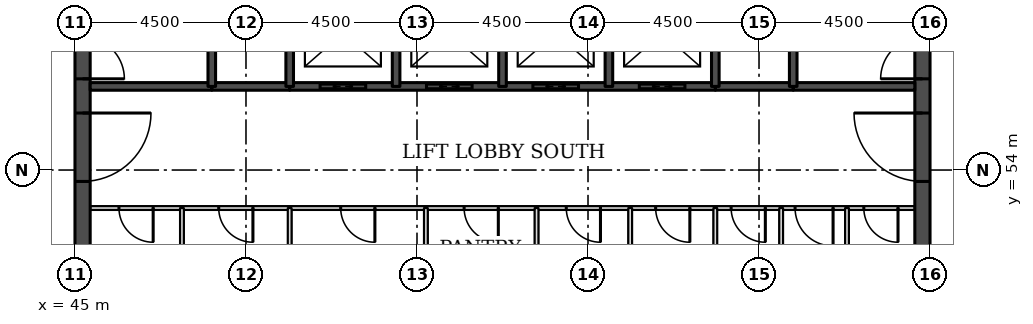
"""IFC4 building model, lengths in metres.
Left out: names, types, materials, properties, quantities, classifications, styles, units other than length and angle.
Written with IfcOpenShell. Run it as: python <this file> out.ifc"""

import sys

from ifc_helpers import new_model, si_unit, direction, frame, frame_2d, origin, place, context, subcontext, project, spatial, rectangle, extrude, element, fill, save


model = new_model("IFC4")
c1 = context("Model", 3, precision=1e-05, world=origin(), true_north=direction((0.0, 1.0)))
c2 = subcontext(c1, "Body", "Model", "MODEL_VIEW")
j1 = project(units=[si_unit("LENGTHUNIT", "METRE"), si_unit("PLANEANGLEUNIT", "RADIAN")], contexts=[c1])
p1 = place(None, origin())
s1 = spatial("IfcSite", under=j1, at=p1, CompositionType="ELEMENT")
p2 = place(p1, origin())
s2 = spatial("IfcBuilding", under=s1, at=p2, CompositionType="ELEMENT")
p3 = place(p2, frame((0.0, 0.0, 226.7)))
s3 = spatial("IfcBuildingStorey", under=s2, at=p3, CompositionType="ELEMENT", Elevation=226.7)
p4 = place(p3, frame((45.2, 49.5, 0.0), z_axis=(0.0, 0.0, 1.0), x_axis=(0.0, 1.0, 0.0)))
e1 = element("IfcWall", 1, at=p4, inside=s3, PredefinedType="SHEAR", context=c2, shape_type="SweptSolid", body=[
    extrude(rectangle(XDim=22.5, YDim=0.4, at=frame_2d((11.25, 0.0))), origin(), (0.0, 0.0, 1.0), 3.7),
])
p5 = place(p4, frame((4.2, 0.0, 0.0)))
e2 = element("IfcOpeningElement", 2, at=p5, cuts=e1, PredefinedType="OPENING", context=c2, shape_type="SweptSolid", body=[
    extrude(rectangle(XDim=1.8, YDim=2.1, at=frame_2d((0.9, 1.05))), frame((0.0, 0.21, 0.0), z_axis=(0.0, -1.0, 0.0), x_axis=(1.0, 0.0, 0.0)), (0.0, 0.0, 1.0), 0.42),
])
p6 = place(p4, frame((6.9, 0.0, 0.0)))
e3 = element("IfcOpeningElement", 3, at=p6, cuts=e1, PredefinedType="OPENING", context=c2, shape_type="SweptSolid", body=[
    extrude(rectangle(XDim=1.1, YDim=2.1, at=frame_2d((0.55, 1.05))), frame((0.0, 0.21, 0.0), z_axis=(0.0, -1.0, 0.0), x_axis=(1.0, 0.0, 0.0)), (0.0, 0.0, 1.0), 0.42),
])
p7 = place(p4, frame((13.6, 0.0, 0.0)))
e4 = element("IfcOpeningElement", 4, at=p7, cuts=e1, PredefinedType="OPENING", context=c2, shape_type="SweptSolid", body=[
    extrude(rectangle(XDim=1.1, YDim=2.1, at=frame_2d((0.55, 1.05))), frame((0.0, 0.21, 0.0), z_axis=(0.0, -1.0, 0.0), x_axis=(1.0, 0.0, 0.0)), (0.0, 0.0, 1.0), 0.42),
])
p8 = place(p4, frame((16.5, 0.0, 0.0)))
e5 = element("IfcOpeningElement", 5, at=p8, cuts=e1, PredefinedType="OPENING", context=c2, shape_type="SweptSolid", body=[
    extrude(rectangle(XDim=1.8, YDim=2.1, at=frame_2d((0.9, 1.05))), frame((0.0, 0.21, 0.0), z_axis=(0.0, -1.0, 0.0), x_axis=(1.0, 0.0, 0.0)), (0.0, 0.0, 1.0), 0.42),
])
p9 = place(p3, frame((67.3, 49.5, 0.0), z_axis=(0.0, 0.0, 1.0), x_axis=(0.0, 1.0, 0.0)))
e6 = element("IfcWall", 6, at=p9, inside=s3, PredefinedType="SHEAR", context=c2, shape_type="SweptSolid", body=[
    extrude(rectangle(XDim=22.5, YDim=0.4, at=frame_2d((11.25, 0.0))), origin(), (0.0, 0.0, 1.0), 3.7),
])
p10 = place(p9, frame((4.2, 0.0, 0.0)))
e7 = element("IfcOpeningElement", 7, at=p10, cuts=e6, PredefinedType="OPENING", context=c2, shape_type="SweptSolid", body=[
    extrude(rectangle(XDim=1.8, YDim=2.1, at=frame_2d((0.9, 1.05))), frame((0.0, 0.21, 0.0), z_axis=(0.0, -1.0, 0.0), x_axis=(1.0, 0.0, 0.0)), (0.0, 0.0, 1.0), 0.42),
])
p11 = place(p9, frame((6.9, 0.0, 0.0)))
e8 = element("IfcOpeningElement", 8, at=p11, cuts=e6, PredefinedType="OPENING", context=c2, shape_type="SweptSolid", body=[
    extrude(rectangle(XDim=1.1, YDim=2.1, at=frame_2d((0.55, 1.05))), frame((0.0, 0.21, 0.0), z_axis=(0.0, -1.0, 0.0), x_axis=(1.0, 0.0, 0.0)), (0.0, 0.0, 1.0), 0.42),
])
p12 = place(p9, frame((13.6, 0.0, 0.0)))
e9 = element("IfcOpeningElement", 9, at=p12, cuts=e6, PredefinedType="OPENING", context=c2, shape_type="SweptSolid", body=[
    extrude(rectangle(XDim=1.1, YDim=2.1, at=frame_2d((0.55, 1.05))), frame((0.0, 0.21, 0.0), z_axis=(0.0, -1.0, 0.0), x_axis=(1.0, 0.0, 0.0)), (0.0, 0.0, 1.0), 0.42),
])
p13 = place(p9, frame((16.5, 0.0, 0.0)))
e10 = element("IfcOpeningElement", 10, at=p13, cuts=e6, PredefinedType="OPENING", context=c2, shape_type="SweptSolid", body=[
    extrude(rectangle(XDim=1.8, YDim=2.1, at=frame_2d((0.9, 1.05))), frame((0.0, 0.21, 0.0), z_axis=(0.0, -1.0, 0.0), x_axis=(1.0, 0.0, 0.0)), (0.0, 0.0, 1.0), 0.42),
])
p14 = place(p3, frame((45.4, 53.0, 0.0), z_axis=(0.0, 0.0, 1.0), x_axis=(1.0, 0.0, 0.0)))
e11 = element("IfcWall", 11, at=p14, inside=s3, PredefinedType="PARTITIONING", context=c2, shape_type="SweptSolid", body=[
    extrude(rectangle(XDim=21.7, YDim=0.1, at=frame_2d((10.85, 0.0))), origin(), (0.0, 0.0, 1.0), 3.55),
])
p15 = place(p14, frame((20.357, 0.0, 0.0)))
e12 = element("IfcOpeningElement", 12, at=p15, cuts=e11, PredefinedType="OPENING", context=c2, shape_type="SweptSolid", body=[
    extrude(rectangle(XDim=0.9, YDim=2.1, at=frame_2d((0.45, 1.05))), frame((0.0, 0.06, 0.0), z_axis=(0.0, -1.0, 0.0), x_axis=(1.0, 0.0, 0.0)), (0.0, 0.0, 1.0), 0.12),
])
p16 = place(p14, frame((18.549, 0.0, 0.0)))
e13 = element("IfcOpeningElement", 13, at=p16, cuts=e11, PredefinedType="OPENING", context=c2, shape_type="SweptSolid", body=[
    extrude(rectangle(XDim=1.0, YDim=2.1, at=frame_2d((0.5, 1.05))), frame((0.0, 0.06, 0.0), z_axis=(0.0, -1.0, 0.0), x_axis=(1.0, 0.0, 0.0)), (0.0, 0.0, 1.0), 0.12),
])
p17 = place(p14, frame((16.866, 0.0, 0.0)))
e14 = element("IfcOpeningElement", 14, at=p17, cuts=e11, PredefinedType="OPENING", context=c2, shape_type="SweptSolid", body=[
    extrude(rectangle(XDim=0.9, YDim=2.1, at=frame_2d((0.45, 1.05))), frame((0.0, 0.06, 0.0), z_axis=(0.0, -1.0, 0.0), x_axis=(1.0, 0.0, 0.0)), (0.0, 0.0, 1.0), 0.12),
])
p18 = place(p14, frame((0.758, 0.0, 0.0)))
e15 = element("IfcOpeningElement", 15, at=p18, cuts=e11, PredefinedType="OPENING", context=c2, shape_type="SweptSolid", body=[
    extrude(rectangle(XDim=0.9, YDim=2.1, at=frame_2d((0.45, 1.05))), frame((0.0, 0.06, 0.0), z_axis=(0.0, -1.0, 0.0), x_axis=(1.0, 0.0, 0.0)), (0.0, 0.0, 1.0), 0.12),
])
p19 = place(p14, frame((3.383, 0.0, 0.0)))
e16 = element("IfcOpeningElement", 16, at=p19, cuts=e11, PredefinedType="OPENING", context=c2, shape_type="SweptSolid", body=[
    extrude(rectangle(XDim=0.9, YDim=2.1, at=frame_2d((0.45, 1.05))), frame((0.0, 0.06, 0.0), z_axis=(0.0, -1.0, 0.0), x_axis=(1.0, 0.0, 0.0)), (0.0, 0.0, 1.0), 0.12),
])
p20 = place(p14, frame((6.592, 0.0, 0.0)))
e17 = element("IfcOpeningElement", 17, at=p20, cuts=e11, PredefinedType="OPENING", context=c2, shape_type="SweptSolid", body=[
    extrude(rectangle(XDim=0.9, YDim=2.1, at=frame_2d((0.45, 1.05))), frame((0.0, 0.06, 0.0), z_axis=(0.0, -1.0, 0.0), x_axis=(1.0, 0.0, 0.0)), (0.0, 0.0, 1.0), 0.12),
])
p21 = place(p14, frame((9.84, 0.0, 0.0)))
e18 = element("IfcOpeningElement", 18, at=p21, cuts=e11, PredefinedType="OPENING", context=c2, shape_type="SweptSolid", body=[
    extrude(rectangle(XDim=0.9, YDim=2.1, at=frame_2d((0.45, 1.05))), frame((0.0, 0.06, 0.0), z_axis=(0.0, -1.0, 0.0), x_axis=(1.0, 0.0, 0.0)), (0.0, 0.0, 1.0), 0.12),
])
p22 = place(p14, frame((12.528, 0.0, 0.0)))
e19 = element("IfcOpeningElement", 19, at=p22, cuts=e11, PredefinedType="OPENING", context=c2, shape_type="SweptSolid", body=[
    extrude(rectangle(XDim=0.9, YDim=2.1, at=frame_2d((0.45, 1.05))), frame((0.0, 0.06, 0.0), z_axis=(0.0, -1.0, 0.0), x_axis=(1.0, 0.0, 0.0)), (0.0, 0.0, 1.0), 0.12),
])
p23 = place(p14, frame((14.88, 0.0, 0.0)))
e20 = element("IfcOpeningElement", 20, at=p23, cuts=e11, PredefinedType="OPENING", context=c2, shape_type="SweptSolid", body=[
    extrude(rectangle(XDim=0.9, YDim=2.1, at=frame_2d((0.45, 1.05))), frame((0.0, 0.06, 0.0), z_axis=(0.0, -1.0, 0.0), x_axis=(1.0, 0.0, 0.0)), (0.0, 0.0, 1.0), 0.12),
])
for number, where, z_axis, x_axis in (
    (21, (48.6, 56.2, 0.0), (0.0, 0.0, 1.0), (1.0, 0.0, 0.0)),
    (22, (61.85, 56.2, 0.0), (0.0, 0.0, 1.0), (1.0, 0.0, 0.0)),
):
    element("IfcWall", number, at=place(p3, frame(where, z_axis=z_axis, x_axis=x_axis)), inside=s3, PredefinedType="SOLIDWALL", context=c2, shape_type="SweptSolid", body=[
        extrude(rectangle(XDim=2.05, YDim=0.2, at=frame_2d((1.025, 0.0))), origin(), (0.0, 0.0, 1.0), 3.55),
    ])
p24 = place(p3, frame((45.4, 56.2, 0.0), z_axis=(0.0, 0.0, 1.0), x_axis=(1.0, 0.0, 0.0)))
e23 = element("IfcWall", 23, at=p24, inside=s3, PredefinedType="SOLIDWALL", context=c2, shape_type="SweptSolid", body=[
    extrude(rectangle(XDim=3.2, YDim=0.2, at=frame_2d((1.6, 0.0))), origin(), (0.0, 0.0, 1.0), 3.55),
])
p25 = place(p3, frame((50.65, 56.2, 0.0), z_axis=(0.0, 0.0, 1.0), x_axis=(1.0, 0.0, 0.0)))
e24 = element("IfcWall", 24, at=p25, inside=s3, PredefinedType="SOLIDWALL", context=c2, shape_type="SweptSolid", body=[
    extrude(rectangle(XDim=11.2, YDim=0.2, at=frame_2d((5.6, 0.0))), origin(), (0.0, 0.0, 1.0), 3.55),
])
p26 = place(p25, frame((0.8, 0.0, 0.0)))
e25 = element("IfcOpeningElement", 25, at=p26, cuts=e24, PredefinedType="OPENING", context=c2, shape_type="SweptSolid", body=[
    extrude(rectangle(XDim=1.2, YDim=2.1, at=frame_2d((0.6, 1.05))), frame((0.0, 0.11, 0.0), z_axis=(0.0, -1.0, 0.0), x_axis=(1.0, 0.0, 0.0)), (0.0, 0.0, 1.0), 0.22),
])
p27 = place(p25, frame((3.6, 0.0, 0.0)))
e26 = element("IfcOpeningElement", 26, at=p27, cuts=e24, PredefinedType="OPENING", context=c2, shape_type="SweptSolid", body=[
    extrude(rectangle(XDim=1.2, YDim=2.1, at=frame_2d((0.6, 1.05))), frame((0.0, 0.11, 0.0), z_axis=(0.0, -1.0, 0.0), x_axis=(1.0, 0.0, 0.0)), (0.0, 0.0, 1.0), 0.22),
])
p28 = place(p25, frame((6.4, 0.0, 0.0)))
e27 = element("IfcOpeningElement", 27, at=p28, cuts=e24, PredefinedType="OPENING", context=c2, shape_type="SweptSolid", body=[
    extrude(rectangle(XDim=1.2, YDim=2.1, at=frame_2d((0.6, 1.05))), frame((0.0, 0.11, 0.0), z_axis=(0.0, -1.0, 0.0), x_axis=(1.0, 0.0, 0.0)), (0.0, 0.0, 1.0), 0.22),
])
p29 = place(p25, frame((9.2, 0.0, 0.0)))
e28 = element("IfcOpeningElement", 28, at=p29, cuts=e24, PredefinedType="OPENING", context=c2, shape_type="SweptSolid", body=[
    extrude(rectangle(XDim=1.2, YDim=2.1, at=frame_2d((0.6, 1.05))), frame((0.0, 0.11, 0.0), z_axis=(0.0, -1.0, 0.0), x_axis=(1.0, 0.0, 0.0)), (0.0, 0.0, 1.0), 0.22),
])
p30 = place(p3, frame((63.9, 56.2, 0.0), z_axis=(0.0, 0.0, 1.0), x_axis=(1.0, 0.0, 0.0)))
e29 = element("IfcWall", 29, at=p30, inside=s3, PredefinedType="SOLIDWALL", context=c2, shape_type="SweptSolid", body=[
    extrude(rectangle(XDim=3.2, YDim=0.2, at=frame_2d((1.6, 0.0))), origin(), (0.0, 0.0, 1.0), 3.55),
])
p31 = place(p3, frame((47.815, 49.9, 0.0), z_axis=(0.0, 0.0, 1.0), x_axis=(0.0, 1.0, 0.0)))
e30 = element("IfcWall", 30, at=p31, inside=s3, PredefinedType="PARTITIONING", context=c2, shape_type="SweptSolid", body=[
    extrude(rectangle(XDim=3.1, YDim=0.1, at=frame_2d((1.55, 0.0))), origin(), (0.0, 0.0, 1.0), 3.55),
])
p32 = place(p3, frame((48.6, 56.2, 0.0), z_axis=(0.0, 0.0, 1.0), x_axis=(0.0, 1.0, 0.0)))
e31 = element("IfcWall", 31, at=p32, inside=s3, PredefinedType="SOLIDWALL", context=c2, shape_type="SweptSolid", body=[
    extrude(rectangle(XDim=5.8, YDim=0.2, at=frame_2d((2.9, 0.0))), origin(), (0.0, 0.0, 1.0), 3.55),
])
p33 = place(p3, frame((50.65, 49.9, 0.0), z_axis=(0.0, 0.0, 1.0), x_axis=(0.0, 1.0, 0.0)))
e32 = element("IfcWall", 32, at=p33, inside=s3, PredefinedType="PARTITIONING", context=c2, shape_type="SweptSolid", body=[
    extrude(rectangle(XDim=3.1, YDim=0.1, at=frame_2d((1.55, 0.0))), origin(), (0.0, 0.0, 1.0), 3.55),
])
for number, where, z_axis, x_axis in (
    (33, (50.65, 56.2, 0.0), (0.0, 0.0, 1.0), (0.0, 1.0, 0.0)),
    (34, (53.45, 56.2, 0.0), (0.0, 0.0, 1.0), (0.0, 1.0, 0.0)),
):
    element("IfcWall", number, at=place(p3, frame(where, z_axis=z_axis, x_axis=x_axis)), inside=s3, PredefinedType="SOLIDWALL", context=c2, shape_type="SweptSolid", body=[
        extrude(rectangle(XDim=2.8, YDim=0.2, at=frame_2d((1.4, 0.0))), origin(), (0.0, 0.0, 1.0), 3.55),
    ])
p34 = place(p3, frame((54.234, 49.9, 0.0), z_axis=(0.0, 0.0, 1.0), x_axis=(0.0, 1.0, 0.0)))
e35 = element("IfcWall", 35, at=p34, inside=s3, PredefinedType="PARTITIONING", context=c2, shape_type="SweptSolid", body=[
    extrude(rectangle(XDim=3.1, YDim=0.1, at=frame_2d((1.55, 0.0))), origin(), (0.0, 0.0, 1.0), 3.55),
])
p35 = place(p3, frame((56.25, 56.2, 0.0), z_axis=(0.0, 0.0, 1.0), x_axis=(0.0, 1.0, 0.0)))
e36 = element("IfcWall", 36, at=p35, inside=s3, PredefinedType="SOLIDWALL", context=c2, shape_type="SweptSolid", body=[
    extrude(rectangle(XDim=2.8, YDim=0.2, at=frame_2d((1.4, 0.0))), origin(), (0.0, 0.0, 1.0), 3.55),
])
p36 = place(p3, frame((57.146, 49.9, 0.0), z_axis=(0.0, 0.0, 1.0), x_axis=(0.0, 1.0, 0.0)))
e37 = element("IfcWall", 37, at=p36, inside=s3, PredefinedType="PARTITIONING", context=c2, shape_type="SweptSolid", body=[
    extrude(rectangle(XDim=3.1, YDim=0.1, at=frame_2d((1.55, 0.0))), origin(), (0.0, 0.0, 1.0), 3.55),
])
p37 = place(p3, frame((59.05, 56.2, 0.0), z_axis=(0.0, 0.0, 1.0), x_axis=(0.0, 1.0, 0.0)))
e38 = element("IfcWall", 38, at=p37, inside=s3, PredefinedType="SOLIDWALL", context=c2, shape_type="SweptSolid", body=[
    extrude(rectangle(XDim=2.8, YDim=0.2, at=frame_2d((1.4, 0.0))), origin(), (0.0, 0.0, 1.0), 3.55),
])
for number, where, z_axis, x_axis in (
    (39, (59.61, 49.9, 0.0), (0.0, 0.0, 1.0), (0.0, 1.0, 0.0)),
    (40, (61.85, 49.9, 0.0), (0.0, 0.0, 1.0), (0.0, 1.0, 0.0)),
):
    element("IfcWall", number, at=place(p3, frame(where, z_axis=z_axis, x_axis=x_axis)), inside=s3, PredefinedType="PARTITIONING", context=c2, shape_type="SweptSolid", body=[
        extrude(rectangle(XDim=3.1, YDim=0.1, at=frame_2d((1.55, 0.0))), origin(), (0.0, 0.0, 1.0), 3.55),
    ])
p38 = place(p3, frame((61.85, 56.2, 0.0), z_axis=(0.0, 0.0, 1.0), x_axis=(0.0, 1.0, 0.0)))
e41 = element("IfcWall", 41, at=p38, inside=s3, PredefinedType="SOLIDWALL", context=c2, shape_type="SweptSolid", body=[
    extrude(rectangle(XDim=2.8, YDim=0.2, at=frame_2d((1.4, 0.0))), origin(), (0.0, 0.0, 1.0), 3.55),
])
p39 = place(p3, frame((63.583, 49.9, 0.0), z_axis=(0.0, 0.0, 1.0), x_axis=(0.0, 1.0, 0.0)))
e42 = element("IfcWall", 42, at=p39, inside=s3, PredefinedType="PARTITIONING", context=c2, shape_type="SweptSolid", body=[
    extrude(rectangle(XDim=3.1, YDim=0.1, at=frame_2d((1.55, 0.0))), origin(), (0.0, 0.0, 1.0), 3.55),
])
p40 = place(p3, frame((63.9, 56.2, 0.0), z_axis=(0.0, 0.0, 1.0), x_axis=(0.0, 1.0, 0.0)))
e43 = element("IfcWall", 43, at=p40, inside=s3, PredefinedType="SOLIDWALL", context=c2, shape_type="SweptSolid", body=[
    extrude(rectangle(XDim=5.8, YDim=0.2, at=frame_2d((2.9, 0.0))), origin(), (0.0, 0.0, 1.0), 3.55),
])
p41 = place(p3, frame((65.315, 49.9, 0.0), z_axis=(0.0, 0.0, 1.0), x_axis=(0.0, 1.0, 0.0)))
e44 = element("IfcWall", 44, at=p41, inside=s3, PredefinedType="PARTITIONING", context=c2, shape_type="SweptSolid", body=[
    extrude(rectangle(XDim=3.1, YDim=0.1, at=frame_2d((1.55, 0.0))), origin(), (0.0, 0.0, 1.0), 3.55),
])
p42 = place(p26, origin())
e45 = element("IfcDoor", 45, at=p42, inside=s3, OperationType="DOUBLE_DOOR_SLIDING", PredefinedType="DOOR", context=c2, shape_type="SweptSolid", body=[
    extrude(rectangle(XDim=1.2, YDim=2.1, at=frame_2d((0.6, 1.05))), frame((0.0, 0.025, 0.0), z_axis=(0.0, -1.0, 0.0), x_axis=(1.0, 0.0, 0.0)), (0.0, 0.0, 1.0), 0.05),
])
fill(e25, e45)
p43 = place(p27, origin())
e46 = element("IfcDoor", 46, at=p43, inside=s3, OperationType="DOUBLE_DOOR_SLIDING", PredefinedType="DOOR", context=c2, shape_type="SweptSolid", body=[
    extrude(rectangle(XDim=1.2, YDim=2.1, at=frame_2d((0.6, 1.05))), frame((0.0, 0.025, 0.0), z_axis=(0.0, -1.0, 0.0), x_axis=(1.0, 0.0, 0.0)), (0.0, 0.0, 1.0), 0.05),
])
fill(e26, e46)
p44 = place(p28, origin())
e47 = element("IfcDoor", 47, at=p44, inside=s3, OperationType="DOUBLE_DOOR_SLIDING", PredefinedType="DOOR", context=c2, shape_type="SweptSolid", body=[
    extrude(rectangle(XDim=1.2, YDim=2.1, at=frame_2d((0.6, 1.05))), frame((0.0, 0.025, 0.0), z_axis=(0.0, -1.0, 0.0), x_axis=(1.0, 0.0, 0.0)), (0.0, 0.0, 1.0), 0.05),
])
fill(e27, e47)
p45 = place(p29, origin())
e48 = element("IfcDoor", 48, at=p45, inside=s3, OperationType="DOUBLE_DOOR_SLIDING", PredefinedType="DOOR", context=c2, shape_type="SweptSolid", body=[
    extrude(rectangle(XDim=1.2, YDim=2.1, at=frame_2d((0.6, 1.05))), frame((0.0, 0.025, 0.0), z_axis=(0.0, -1.0, 0.0), x_axis=(1.0, 0.0, 0.0)), (0.0, 0.0, 1.0), 0.05),
])
fill(e28, e48)
p46 = place(p5, frame((1.8, 0.0, 0.0), z_axis=(0.0, 0.0, 1.0), x_axis=(-1.0, 0.0, 0.0)))
e49 = element("IfcDoor", 49, at=p46, inside=s3, OperationType="SINGLE_SWING_LEFT", PredefinedType="DOOR", context=c2, shape_type="SweptSolid", body=[
    extrude(rectangle(XDim=1.8, YDim=2.1, at=frame_2d((0.9, 1.05))), frame((0.0, 0.025, 0.0), z_axis=(0.0, -1.0, 0.0), x_axis=(1.0, 0.0, 0.0)), (0.0, 0.0, 1.0), 0.05),
])
fill(e2, e49)
p47 = place(p6, frame((1.1, 0.0, 0.0), z_axis=(0.0, 0.0, 1.0), x_axis=(-1.0, 0.0, 0.0)))
e50 = element("IfcDoor", 50, at=p47, inside=s3, OperationType="SINGLE_SWING_RIGHT", PredefinedType="DOOR", context=c2, shape_type="SweptSolid", body=[
    extrude(rectangle(XDim=1.1, YDim=2.1, at=frame_2d((0.55, 1.05))), frame((0.0, 0.025, 0.0), z_axis=(0.0, -1.0, 0.0), x_axis=(1.0, 0.0, 0.0)), (0.0, 0.0, 1.0), 0.05),
])
fill(e3, e50)
p48 = place(p10, origin())
e51 = element("IfcDoor", 51, at=p48, inside=s3, OperationType="SINGLE_SWING_RIGHT", PredefinedType="DOOR", context=c2, shape_type="SweptSolid", body=[
    extrude(rectangle(XDim=1.8, YDim=2.1, at=frame_2d((0.9, 1.05))), frame((0.0, 0.025, 0.0), z_axis=(0.0, -1.0, 0.0), x_axis=(1.0, 0.0, 0.0)), (0.0, 0.0, 1.0), 0.05),
])
fill(e7, e51)
p49 = place(p11, origin())
e52 = element("IfcDoor", 52, at=p49, inside=s3, OperationType="SINGLE_SWING_LEFT", PredefinedType="DOOR", context=c2, shape_type="SweptSolid", body=[
    extrude(rectangle(XDim=1.1, YDim=2.1, at=frame_2d((0.55, 1.05))), frame((0.0, 0.025, 0.0), z_axis=(0.0, -1.0, 0.0), x_axis=(1.0, 0.0, 0.0)), (0.0, 0.0, 1.0), 0.05),
])
fill(e8, e52)
p50 = place(p15, frame((0.9, 0.0, 0.0), z_axis=(0.0, 0.0, 1.0), x_axis=(-1.0, 0.0, 0.0)))
e53 = element("IfcDoor", 53, at=p50, inside=s3, OperationType="SINGLE_SWING_LEFT", PredefinedType="DOOR", context=c2, shape_type="SweptSolid", body=[
    extrude(rectangle(XDim=0.9, YDim=2.1, at=frame_2d((0.45, 1.05))), frame((0.0, 0.025, 0.0), z_axis=(0.0, -1.0, 0.0), x_axis=(1.0, 0.0, 0.0)), (0.0, 0.0, 1.0), 0.05),
])
fill(e12, e53)
p51 = place(p16, frame((1.0, 0.0, 0.0), z_axis=(0.0, 0.0, 1.0), x_axis=(-1.0, 0.0, 0.0)))
e54 = element("IfcDoor", 54, at=p51, inside=s3, OperationType="SINGLE_SWING_LEFT", PredefinedType="DOOR", context=c2, shape_type="SweptSolid", body=[
    extrude(rectangle(XDim=1.0, YDim=2.1, at=frame_2d((0.5, 1.05))), frame((0.0, 0.025, 0.0), z_axis=(0.0, -1.0, 0.0), x_axis=(1.0, 0.0, 0.0)), (0.0, 0.0, 1.0), 0.05),
])
fill(e13, e54)
p52 = place(p17, frame((0.9, 0.0, 0.0), z_axis=(0.0, 0.0, 1.0), x_axis=(-1.0, 0.0, 0.0)))
e55 = element("IfcDoor", 55, at=p52, inside=s3, OperationType="SINGLE_SWING_LEFT", PredefinedType="DOOR", context=c2, shape_type="SweptSolid", body=[
    extrude(rectangle(XDim=0.9, YDim=2.1, at=frame_2d((0.45, 1.05))), frame((0.0, 0.025, 0.0), z_axis=(0.0, -1.0, 0.0), x_axis=(1.0, 0.0, 0.0)), (0.0, 0.0, 1.0), 0.05),
])
fill(e14, e55)
p53 = place(p18, frame((0.9, 0.0, 0.0), z_axis=(0.0, 0.0, 1.0), x_axis=(-1.0, 0.0, 0.0)))
e56 = element("IfcDoor", 56, at=p53, inside=s3, OperationType="SINGLE_SWING_LEFT", PredefinedType="DOOR", context=c2, shape_type="SweptSolid", body=[
    extrude(rectangle(XDim=0.9, YDim=2.1, at=frame_2d((0.45, 1.05))), frame((0.0, 0.025, 0.0), z_axis=(0.0, -1.0, 0.0), x_axis=(1.0, 0.0, 0.0)), (0.0, 0.0, 1.0), 0.05),
])
fill(e15, e56)
p54 = place(p19, frame((0.9, 0.0, 0.0), z_axis=(0.0, 0.0, 1.0), x_axis=(-1.0, 0.0, 0.0)))
e57 = element("IfcDoor", 57, at=p54, inside=s3, OperationType="SINGLE_SWING_LEFT", PredefinedType="DOOR", context=c2, shape_type="SweptSolid", body=[
    extrude(rectangle(XDim=0.9, YDim=2.1, at=frame_2d((0.45, 1.05))), frame((0.0, 0.025, 0.0), z_axis=(0.0, -1.0, 0.0), x_axis=(1.0, 0.0, 0.0)), (0.0, 0.0, 1.0), 0.05),
])
fill(e16, e57)
p55 = place(p20, frame((0.9, 0.0, 0.0), z_axis=(0.0, 0.0, 1.0), x_axis=(-1.0, 0.0, 0.0)))
e58 = element("IfcDoor", 58, at=p55, inside=s3, OperationType="SINGLE_SWING_LEFT", PredefinedType="DOOR", context=c2, shape_type="SweptSolid", body=[
    extrude(rectangle(XDim=0.9, YDim=2.1, at=frame_2d((0.45, 1.05))), frame((0.0, 0.025, 0.0), z_axis=(0.0, -1.0, 0.0), x_axis=(1.0, 0.0, 0.0)), (0.0, 0.0, 1.0), 0.05),
])
fill(e17, e58)
p56 = place(p21, frame((0.9, 0.0, 0.0), z_axis=(0.0, 0.0, 1.0), x_axis=(-1.0, 0.0, 0.0)))
e59 = element("IfcDoor", 59, at=p56, inside=s3, OperationType="SINGLE_SWING_LEFT", PredefinedType="DOOR", context=c2, shape_type="SweptSolid", body=[
    extrude(rectangle(XDim=0.9, YDim=2.1, at=frame_2d((0.45, 1.05))), frame((0.0, 0.025, 0.0), z_axis=(0.0, -1.0, 0.0), x_axis=(1.0, 0.0, 0.0)), (0.0, 0.0, 1.0), 0.05),
])
fill(e18, e59)
p57 = place(p22, frame((0.9, 0.0, 0.0), z_axis=(0.0, 0.0, 1.0), x_axis=(-1.0, 0.0, 0.0)))
e60 = element("IfcDoor", 60, at=p57, inside=s3, OperationType="SINGLE_SWING_LEFT", PredefinedType="DOOR", context=c2, shape_type="SweptSolid", body=[
    extrude(rectangle(XDim=0.9, YDim=2.1, at=frame_2d((0.45, 1.05))), frame((0.0, 0.025, 0.0), z_axis=(0.0, -1.0, 0.0), x_axis=(1.0, 0.0, 0.0)), (0.0, 0.0, 1.0), 0.05),
])
fill(e19, e60)
p58 = place(p23, frame((0.9, 0.0, 0.0), z_axis=(0.0, 0.0, 1.0), x_axis=(-1.0, 0.0, 0.0)))
e61 = element("IfcDoor", 61, at=p58, inside=s3, OperationType="SINGLE_SWING_LEFT", PredefinedType="DOOR", context=c2, shape_type="SweptSolid", body=[
    extrude(rectangle(XDim=0.9, YDim=2.1, at=frame_2d((0.45, 1.05))), frame((0.0, 0.025, 0.0), z_axis=(0.0, -1.0, 0.0), x_axis=(1.0, 0.0, 0.0)), (0.0, 0.0, 1.0), 0.05),
])
fill(e20, e61)
save(model, sys.argv[1])
